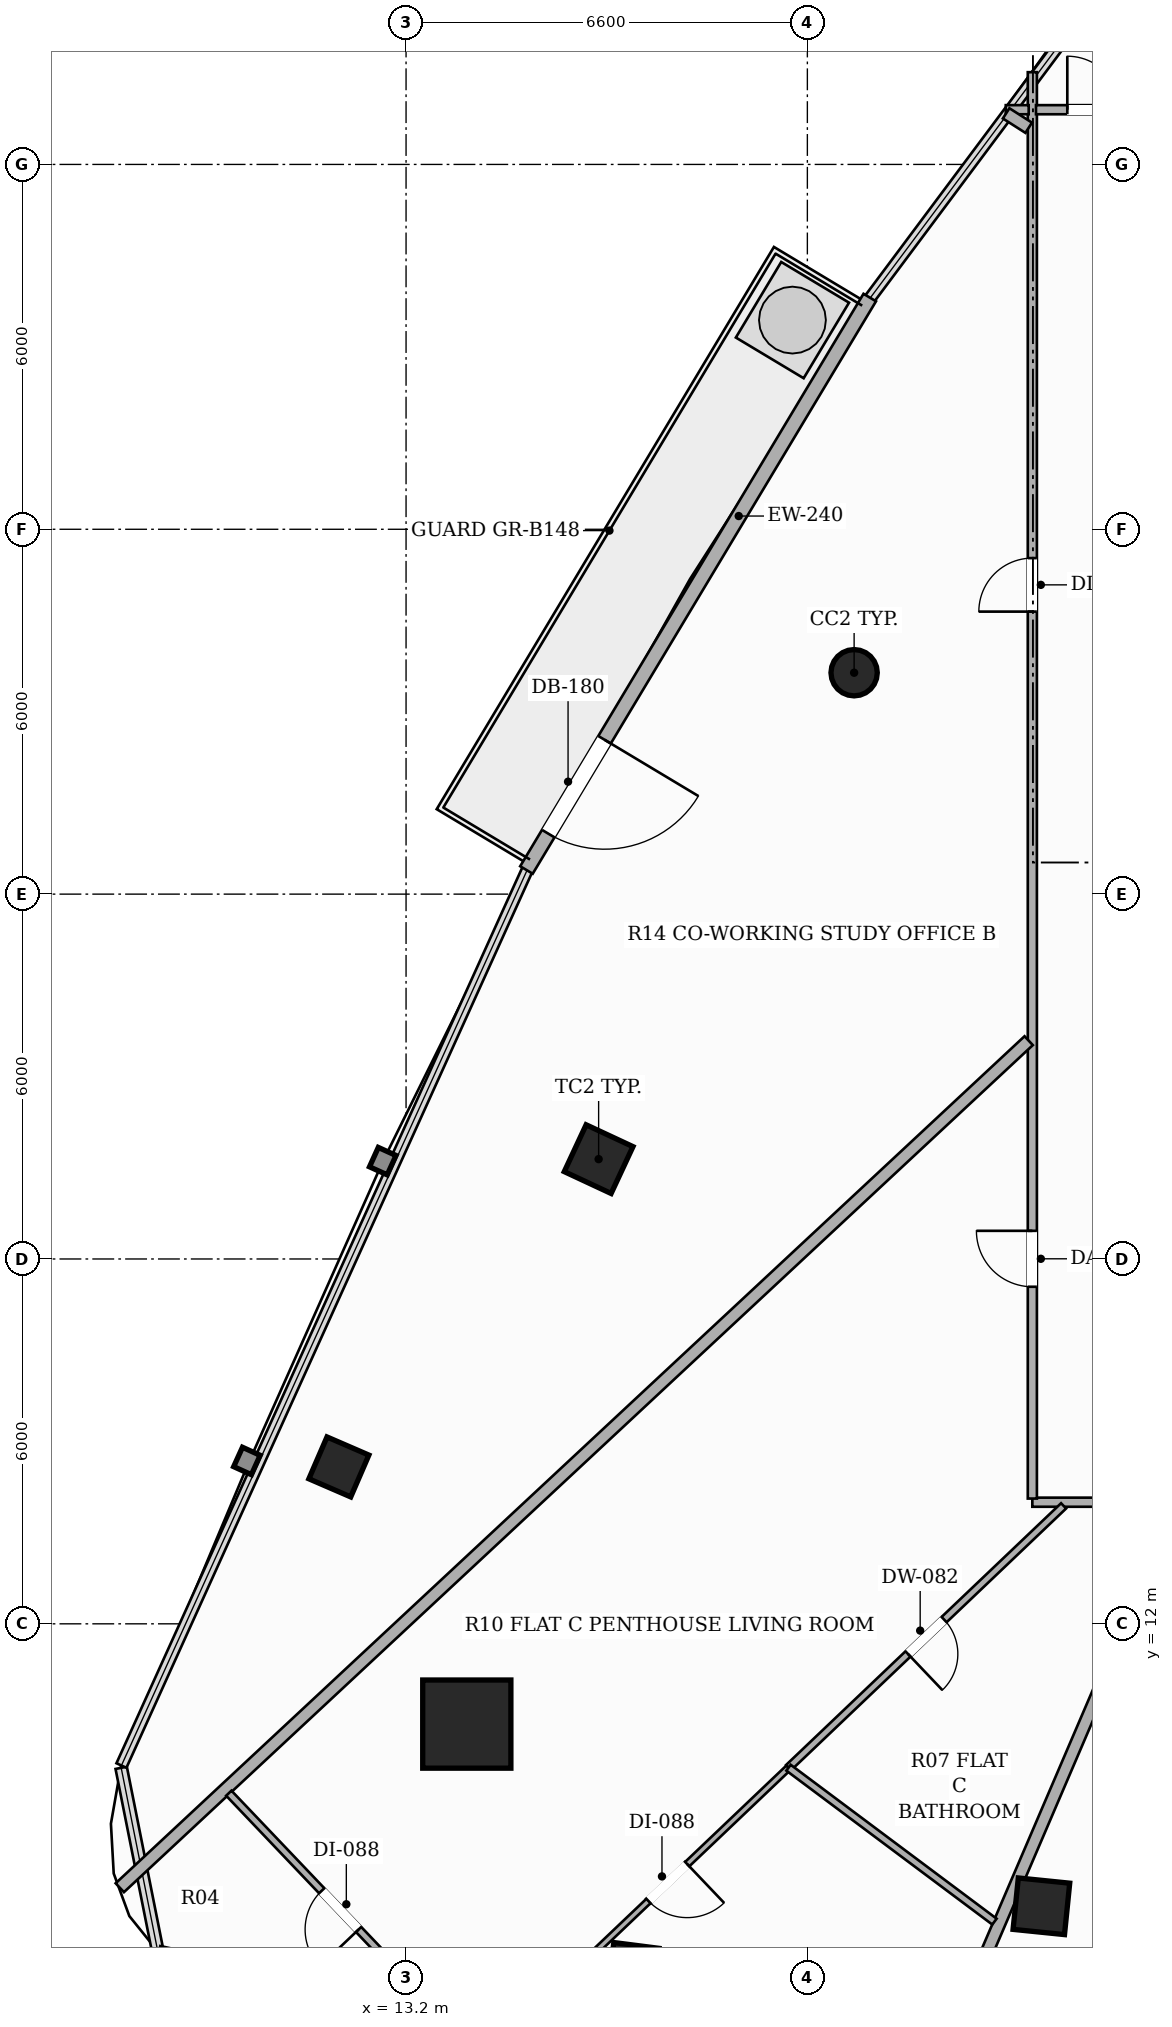
"""IFC4 building model, lengths in metres.
Left out: names, types, materials, properties, quantities, classifications, styles, units other than length and angle.
Written with IfcOpenShell. Run it as: python <this file> out.ifc"""

import sys

from ifc_helpers import new_model, si_unit, direction, frame, frame_2d, origin, origin_2d, place, context, subcontext, project, spatial, rectangle, hollow_rectangle, hollow_circle, extrude, element, fill, save


model = new_model("IFC4")
c1 = context("Model", 3, precision=1e-05, world=origin(), true_north=direction((0.0, 1.0)))
c2 = subcontext(c1, "Body", "Model", "MODEL_VIEW")
j1 = project(units=[si_unit("LENGTHUNIT", "METRE"), si_unit("PLANEANGLEUNIT", "RADIAN")], contexts=[c1])
p1 = place(None, origin())
s1 = spatial("IfcSite", under=j1, at=p1, CompositionType="ELEMENT")
p2 = place(p1, origin())
s2 = spatial("IfcBuilding", under=s1, at=p2, CompositionType="ELEMENT")
p3 = place(p2, frame((0.0, 0.0, 170.45)))
s3 = spatial("IfcBuildingStorey", under=s2, at=p3, CompositionType="ELEMENT", Elevation=170.45)
p4 = place(p3, frame((14.199, 10.351, 0.0), z_axis=(0.0, 0.0, 1.0), x_axis=(1.0, 0.0, 0.0)))
e1 = element("IfcColumn", 1, at=p4, inside=s3, PredefinedType="COLUMN", context=c2, shape_type="SweptSolid", body=[
    extrude(hollow_rectangle(XDim=1.45, YDim=1.45, WallThickness=0.045, at=origin_2d()), origin(), (0.0, 0.0, 1.0), 3.3),
])
p5 = place(p3, frame((20.569, 27.641, 0.0), z_axis=(0.0, 0.0, 1.0), x_axis=(1.0, 0.0, 0.0)))
e2 = element("IfcColumn", 2, at=p5, inside=s3, PredefinedType="COLUMN", context=c2, shape_type="SweptSolid", body=[
    extrude(hollow_circle(Radius=0.381, WallThickness=0.022, at=origin_2d()), origin(), (0.0, 0.0, 1.0), 3.3),
])
for number, where, z_axis, x_axis in (
    (3, (16.367, 19.642, 0.0), (0.0, 0.0, 1.0), (0.423, 0.906, 0.0)),
    (4, (23.649, 7.355, 0.0), (0.0, 0.0, 1.0), (-0.995, 0.101, 0.0)),
):
    element("IfcColumn", number, at=place(p3, frame(where, z_axis=z_axis, x_axis=x_axis)), inside=s3, PredefinedType="COLUMN", context=c2, shape_type="SweptSolid", body=[
        extrude(hollow_rectangle(XDim=0.85, YDim=0.85, WallThickness=0.028, at=origin_2d()), origin(), (0.0, 0.0, 1.0), 3.3),
    ])
for number, where, z_axis, x_axis in (
    (5, (12.095, 14.58, 0.0), (0.0, 0.0, 1.0), (0.397, 0.918, 0.0)),
    (6, (16.941, 6.339, 0.0), (0.0, 0.0, 1.0), (-0.992, 0.127, 0.0)),
):
    element("IfcColumn", number, at=place(p3, frame(where, z_axis=z_axis, x_axis=x_axis)), inside=s3, PredefinedType="COLUMN", context=c2, shape_type="SweptSolid", body=[
        extrude(hollow_rectangle(XDim=0.75, YDim=0.75, WallThickness=0.025, at=origin_2d()), origin(), (0.0, 0.0, 1.0), 3.3),
    ])
p6 = place(p3, frame((20.826, 33.811, 0.0), z_axis=(0.0, 0.0, 1.0), x_axis=(-0.514332213488, -0.857591029669, 0.0)))
e7 = element("IfcWall", 7, at=p6, inside=s3, PredefinedType="SOLIDWALL", context=c2, shape_type="SweptSolid", body=[
    extrude(rectangle(XDim=10.977, YDim=0.24, at=frame_2d((5.489, 0.0))), origin(), (0.0, 0.0, 1.0), 2.624),
])
p7 = place(p6, frame((8.48, 0.0, 0.0)))
e8 = element("IfcOpeningElement", 8, at=p7, cuts=e7, PredefinedType="OPENING", context=c2, shape_type="SweptSolid", body=[
    extrude(rectangle(XDim=1.8, YDim=2.2, at=frame_2d((0.9, 1.1))), frame((0.0, 0.13, 0.0), z_axis=(0.0, -1.0, 0.0), x_axis=(1.0, 0.0, 0.0)), (0.0, 0.0, 1.0), 0.26),
])
p8 = place(p3, frame((26.09, 14.0, 0.0), z_axis=(0.0, 0.0, 1.0), x_axis=(-1.0, 0.0, 0.0)))
e9 = element("IfcWall", 9, at=p8, inside=s3, PredefinedType="PARTITIONING", context=c2, shape_type="SweptSolid", body=[
    extrude(rectangle(XDim=2.59, YDim=0.15, at=frame_2d((1.295, 0.0))), origin(), (0.0, 0.0, 1.0), 2.721),
])
p9 = place(p3, frame((23.5, 14.06, 0.0), z_axis=(0.0, 0.0, 1.0), x_axis=(0.0, 1.0, 0.0)))
e10 = element("IfcWall", 10, at=p9, inside=s3, PredefinedType="PARTITIONING", context=c2, shape_type="SweptSolid", body=[
    extrude(rectangle(XDim=23.457, YDim=0.15, at=frame_2d((11.729, 0.0))), origin(), (0.0, 0.0, 1.0), 2.413),
])
p10 = place(p9, frame((14.586, 0.0, 0.0)))
e11 = element("IfcOpeningElement", 11, at=p10, cuts=e10, PredefinedType="OPENING", context=c2, shape_type="SweptSolid", body=[
    extrude(rectangle(XDim=0.88, YDim=2.1, at=frame_2d((0.44, 1.05))), frame((0.0, 0.085, 0.0), z_axis=(0.0, -1.0, 0.0), x_axis=(1.0, 0.0, 0.0)), (0.0, 0.0, 1.0), 0.17),
])
p11 = place(p9, frame((3.483, 0.0, 0.0)))
e12 = element("IfcOpeningElement", 12, at=p11, cuts=e10, PredefinedType="OPENING", context=c2, shape_type="SweptSolid", body=[
    extrude(rectangle(XDim=0.92, YDim=2.15, at=frame_2d((0.46, 1.075))), frame((0.0, 0.085, 0.0), z_axis=(0.0, -1.0, 0.0), x_axis=(1.0, 0.0, 0.0)), (0.0, 0.0, 1.0), 0.17),
])
p12 = place(p3, frame((23.063, 36.9, 0.0), z_axis=(0.0, 0.0, 1.0), x_axis=(1.0, 0.0, 0.0)))
e13 = element("IfcWall", 13, at=p12, inside=s3, PredefinedType="PARTITIONING", context=c2, shape_type="SweptSolid", body=[
    extrude(rectangle(XDim=0.377, YDim=0.15, at=frame_2d((0.188, 0.0))), origin(), (0.0, 0.0, 1.0), 3.06),
])
p13 = place(p3, frame((23.56, 36.9, 0.0), z_axis=(0.0, 0.0, 1.0), x_axis=(1.0, 0.0, 0.0)))
e14 = element("IfcWall", 14, at=p13, inside=s3, PredefinedType="PARTITIONING", context=c2, shape_type="SweptSolid", body=[
    extrude(rectangle(XDim=2.59, YDim=0.15, at=frame_2d((1.295, 0.0))), origin(), (0.0, 0.0, 1.0), 2.413),
])
p14 = place(p13, frame((0.515, 0.0, 0.0)))
e15 = element("IfcOpeningElement", 15, at=p14, cuts=e14, PredefinedType="OPENING", context=c2, shape_type="SweptSolid", body=[
    extrude(rectangle(XDim=0.88, YDim=2.1, at=frame_2d((0.44, 1.05))), frame((0.0, 0.085, 0.0), z_axis=(0.0, -1.0, 0.0), x_axis=(1.0, 0.0, 0.0)), (0.0, 0.0, 1.0), 0.17),
])
p15 = place(p3, frame((23.44, 21.59, 0.0), z_axis=(0.0, 0.0, 1.0), x_axis=(-0.731574776166, -0.681761209572, 0.0)))
e16 = element("IfcWall", 16, at=p15, inside=s3, PredefinedType="PARTITIONING", context=c2, shape_type="SweptSolid", body=[
    extrude(rectangle(XDim=20.433, YDim=0.2, at=frame_2d((10.216, 0.0))), origin(), (0.0, 0.0, 1.0), 2.413),
])
p16 = place(p3, frame((23.069, 36.84, 0.0), z_axis=(0.0, 0.0, 1.0), x_axis=(0.842563414195, -0.538597152852, 0.0)))
e17 = element("IfcWall", 17, at=p16, inside=s3, PredefinedType="PARTITIONING", context=c2, shape_type="SweptSolid", body=[
    extrude(rectangle(XDim=0.44, YDim=0.2, at=frame_2d((0.22, 0.0))), origin(), (0.0, 0.0, 1.0), 3.06),
])
p17 = place(p3, frame((25.901, 13.94, 0.0), z_axis=(0.0, 0.0, 1.0), x_axis=(-0.394055564824, -0.919086618242, 0.0)))
e18 = element("IfcWall", 18, at=p17, inside=s3, PredefinedType="PARTITIONING", context=c2, shape_type="SweptSolid", body=[
    extrude(rectangle(XDim=10.379, YDim=0.2, at=frame_2d((5.189, 0.0))), origin(), (0.0, 0.0, 1.0), 2.413),
])
p18 = place(p3, frame((24.014, 13.94, 0.0), z_axis=(0.0, 0.0, 1.0), x_axis=(-0.724345202964, -0.68943747138, 0.0)))
e19 = element("IfcWall", 19, at=p18, inside=s3, PredefinedType="PARTITIONING", context=c2, shape_type="SweptSolid", body=[
    extrude(rectangle(XDim=6.246, YDim=0.12, at=frame_2d((3.123, 0.0))), origin(), (0.0, 0.0, 1.0), 2.721),
])
p19 = place(p18, frame((2.713, 0.0, 0.0)))
e20 = element("IfcOpeningElement", 20, at=p19, cuts=e19, PredefinedType="OPENING", context=c2, shape_type="SweptSolid", body=[
    extrude(rectangle(XDim=0.82, YDim=2.1, at=frame_2d((0.41, 1.05))), frame((0.0, 0.07, 0.0), z_axis=(0.0, -1.0, 0.0), x_axis=(1.0, 0.0, 0.0)), (0.0, 0.0, 1.0), 0.14),
])
p20 = place(p3, frame((13.947, 5.369, 0.0), z_axis=(0.0, 0.0, 1.0), x_axis=(-0.689563334415, 0.724225384691, 0.0)))
e21 = element("IfcWall", 21, at=p20, inside=s3, PredefinedType="PARTITIONING", context=c2, shape_type="SweptSolid", body=[
    extrude(rectangle(XDim=5.311, YDim=0.12, at=frame_2d((2.655, 0.0))), origin(), (0.0, 0.0, 1.0), 3.06),
])
p21 = place(p20, frame((2.215, 0.0, 0.0)))
e22 = element("IfcOpeningElement", 22, at=p21, cuts=e21, PredefinedType="OPENING", context=c2, shape_type="SweptSolid", body=[
    extrude(rectangle(XDim=0.88, YDim=2.1, at=frame_2d((0.44, 1.05))), frame((0.0, 0.07, 0.0), z_axis=(0.0, -1.0, 0.0), x_axis=(1.0, 0.0, 0.0)), (0.0, 0.0, 1.0), 0.14),
])
p22 = place(p3, frame((19.49, 9.634, 0.0), z_axis=(0.0, 0.0, 1.0), x_axis=(-0.724311078703, -0.68947332165, 0.0)))
e23 = element("IfcWall", 23, at=p22, inside=s3, PredefinedType="PARTITIONING", context=c2, shape_type="SweptSolid", body=[
    extrude(rectangle(XDim=6.37, YDim=0.1, at=frame_2d((3.185, 0.0))), origin(), (0.0, 0.0, 1.0), 2.413),
])
p23 = place(p22, frame((2.3, 0.0, 0.0)))
e24 = element("IfcOpeningElement", 24, at=p23, cuts=e23, PredefinedType="OPENING", context=c2, shape_type="SweptSolid", body=[
    extrude(rectangle(XDim=0.88, YDim=2.1, at=frame_2d((0.44, 1.05))), frame((0.0, 0.06, 0.0), z_axis=(0.0, -1.0, 0.0), x_axis=(1.0, 0.0, 0.0)), (0.0, 0.0, 1.0), 0.12),
])
p24 = place(p3, frame((22.877, 7.103, 0.0), z_axis=(0.0, 0.0, 1.0), x_axis=(-0.801045056039, 0.598604057951, 0.0)))
e25 = element("IfcWall", 25, at=p24, inside=s3, PredefinedType="PARTITIONING", context=c2, shape_type="SweptSolid", body=[
    extrude(rectangle(XDim=4.228, YDim=0.12, at=frame_2d((2.114, 0.0))), origin(), (0.0, 0.0, 1.0), 2.413),
])
p25 = place(p7, origin())
e26 = element("IfcDoor", 26, at=p25, inside=s3, OperationType="SINGLE_SWING_LEFT", PredefinedType="DOOR", context=c2, shape_type="SweptSolid", body=[
    extrude(rectangle(XDim=1.8, YDim=2.2, at=frame_2d((0.9, 1.1))), frame((0.0, 0.025, 0.0), z_axis=(0.0, -1.0, 0.0), x_axis=(1.0, 0.0, 0.0)), (0.0, 0.0, 1.0), 0.05),
])
fill(e8, e26)
p26 = place(p10, origin())
e27 = element("IfcDoor", 27, at=p26, inside=s3, OperationType="SINGLE_SWING_LEFT", PredefinedType="DOOR", context=c2, shape_type="SweptSolid", body=[
    extrude(rectangle(XDim=0.88, YDim=2.1, at=frame_2d((0.44, 1.05))), frame((0.0, 0.025, 0.0), z_axis=(0.0, -1.0, 0.0), x_axis=(1.0, 0.0, 0.0)), (0.0, 0.0, 1.0), 0.05),
])
fill(e11, e27)
p27 = place(p11, origin())
e28 = element("IfcDoor", 28, at=p27, inside=s3, OperationType="SINGLE_SWING_RIGHT", PredefinedType="DOOR", context=c2, shape_type="SweptSolid", body=[
    extrude(rectangle(XDim=0.92, YDim=2.15, at=frame_2d((0.46, 1.075))), frame((0.0, 0.025, 0.0), z_axis=(0.0, -1.0, 0.0), x_axis=(1.0, 0.0, 0.0)), (0.0, 0.0, 1.0), 0.05),
])
fill(e12, e28)
p28 = place(p19, origin())
e29 = element("IfcDoor", 29, at=p28, inside=s3, OperationType="SINGLE_SWING_RIGHT", PredefinedType="DOOR", context=c2, shape_type="SweptSolid", body=[
    extrude(rectangle(XDim=0.82, YDim=2.1, at=frame_2d((0.41, 1.05))), frame((0.0, 0.025, 0.0), z_axis=(0.0, -1.0, 0.0), x_axis=(1.0, 0.0, 0.0)), (0.0, 0.0, 1.0), 0.05),
])
fill(e20, e29)
p29 = place(p21, origin())
e30 = element("IfcDoor", 30, at=p29, inside=s3, OperationType="SINGLE_SWING_LEFT", PredefinedType="DOOR", context=c2, shape_type="SweptSolid", body=[
    extrude(rectangle(XDim=0.88, YDim=2.1, at=frame_2d((0.44, 1.05))), frame((0.0, 0.025, 0.0), z_axis=(0.0, -1.0, 0.0), x_axis=(1.0, 0.0, 0.0)), (0.0, 0.0, 1.0), 0.05),
])
fill(e22, e30)
p30 = place(p23, origin())
e31 = element("IfcDoor", 31, at=p30, inside=s3, OperationType="SINGLE_SWING_LEFT", PredefinedType="DOOR", context=c2, shape_type="SweptSolid", body=[
    extrude(rectangle(XDim=0.88, YDim=2.1, at=frame_2d((0.44, 1.05))), frame((0.0, 0.025, 0.0), z_axis=(0.0, -1.0, 0.0), x_axis=(1.0, 0.0, 0.0)), (0.0, 0.0, 1.0), 0.05),
])
fill(e24, e31)
p31 = place(p14, origin())
e32 = element("IfcDoor", 32, at=p31, inside=s3, OperationType="SINGLE_SWING_LEFT", PredefinedType="DOOR", context=c2, shape_type="SweptSolid", body=[
    extrude(rectangle(XDim=0.88, YDim=2.1, at=frame_2d((0.44, 1.05))), frame((0.0, 0.025, 0.0), z_axis=(0.0, -1.0, 0.0), x_axis=(1.0, 0.0, 0.0)), (0.0, 0.0, 1.0), 0.05),
])
fill(e15, e32)
save(model, sys.argv[1])
